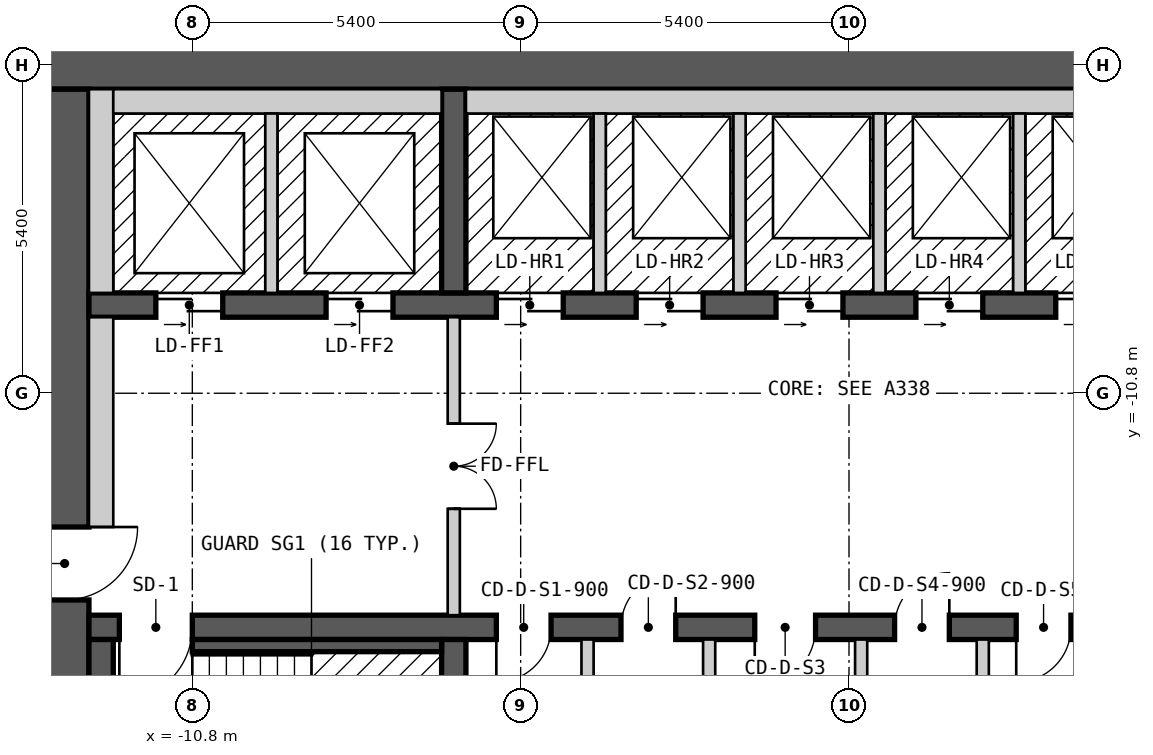
"""IFC4 building model, lengths in metres.
Left out: names, types, materials, properties, quantities, classifications, styles, units other than length and angle.
Written with IfcOpenShell. Run it as: python <this file> out.ifc"""

import sys

from ifc_helpers import new_model, si_unit, direction, frame, frame_2d, origin, place, context, subcontext, project, spatial, rectangle, extrude, element, fill, save


model = new_model("IFC4")
c1 = context("Model", 3, precision=1e-05, world=origin(), true_north=direction((0.0, 1.0)))
c2 = subcontext(c1, "Body", "Model", "MODEL_VIEW")
j1 = project(units=[si_unit("LENGTHUNIT", "METRE"), si_unit("PLANEANGLEUNIT", "RADIAN")], contexts=[c1])
p1 = place(None, origin())
s1 = spatial("IfcSite", under=j1, at=p1, CompositionType="ELEMENT")
p2 = place(p1, origin())
s2 = spatial("IfcBuilding", under=s1, at=p2, CompositionType="ELEMENT")
p3 = place(p2, frame((0.0, 0.0, 138.6)))
s3 = spatial("IfcBuildingStorey", under=s2, at=p3, CompositionType="ELEMENT", Elevation=138.6)
p4 = place(p3, frame((-13.3, -5.4, 0.0), z_axis=(0.0, 0.0, 1.0), x_axis=(1.0, 0.0, 0.0)))
e1 = element("IfcWall", 1, at=p4, inside=s3, PredefinedType="SHEAR", context=c2, shape_type="SweptSolid", body=[
    extrude(rectangle(XDim=26.6, YDim=0.8, at=frame_2d((13.3, 0.0))), origin(), (0.0, 0.0, 1.0), 2.7),
])
p5 = place(p4, frame((23.65, 0.0, 0.0)))
e2 = element("IfcOpeningElement", 2, at=p5, cuts=e1, PredefinedType="OPENING", context=c2, shape_type="SweptSolid", body=[
    extrude(rectangle(XDim=1.2, YDim=2.1, at=frame_2d((0.6, 1.05))), frame((0.0, 0.41, 0.0), z_axis=(0.0, -1.0, 0.0), x_axis=(1.0, 0.0, 0.0)), (0.0, 0.0, 1.0), 0.82),
])
p6 = place(p3, frame((-12.9, -18.2, 0.0), z_axis=(0.0, 0.0, 1.0), x_axis=(0.0, 1.0, 0.0)))
e3 = element("IfcWall", 3, at=p6, inside=s3, PredefinedType="SHEAR", context=c2, shape_type="SweptSolid", body=[
    extrude(rectangle(XDim=12.4, YDim=0.8, at=frame_2d((6.2, 0.0))), origin(), (0.0, 0.0, 1.0), 2.7),
])
p7 = place(p6, frame((4.0, 0.0, 0.0)))
e4 = element("IfcOpeningElement", 4, at=p7, cuts=e3, PredefinedType="OPENING", context=c2, shape_type="SweptSolid", body=[
    extrude(rectangle(XDim=1.2, YDim=2.1, at=frame_2d((0.6, 1.05))), frame((0.0, 0.41, 0.0), z_axis=(0.0, -1.0, 0.0), x_axis=(1.0, 0.0, 0.0)), (0.0, 0.0, 1.0), 0.82),
])
p8 = place(p3, frame((-12.5, -14.65, 0.0), z_axis=(0.0, 0.0, 1.0), x_axis=(1.0, 0.0, 0.0)))
e5 = element("IfcWall", 5, at=p8, inside=s3, PredefinedType="SHEAR", context=c2, shape_type="SweptSolid", body=[
    extrude(rectangle(XDim=25.0, YDim=0.4, at=frame_2d((12.5, 0.0))), origin(), (0.0, 0.0, 1.0), 2.7),
])
p9 = place(p8, frame((1.7, 0.0, 0.0), z_axis=(0.0, 0.0, 1.0), x_axis=(-1.0, 0.0, 0.0)))
e6 = element("IfcOpeningElement", 6, at=p9, cuts=e5, PredefinedType="OPENING", context=c2, shape_type="SweptSolid", body=[
    extrude(rectangle(XDim=1.2, YDim=2.1, at=frame_2d((0.6, 1.05))), frame((0.0, 0.21, 0.0), z_axis=(0.0, -1.0, 0.0), x_axis=(1.0, 0.0, 0.0)), (0.0, 0.0, 1.0), 0.42),
])
p10 = place(p8, frame((24.55, 0.0, 0.0), z_axis=(0.0, 0.0, 1.0), x_axis=(-1.0, 0.0, 0.0)))
e7 = element("IfcOpeningElement", 7, at=p10, cuts=e5, PredefinedType="OPENING", context=c2, shape_type="SweptSolid", body=[
    extrude(rectangle(XDim=1.2, YDim=2.1, at=frame_2d((0.6, 1.05))), frame((0.0, 0.21, 0.0), z_axis=(0.0, -1.0, 0.0), x_axis=(1.0, 0.0, 0.0)), (0.0, 0.0, 1.0), 0.42),
])
p11 = place(p8, frame((7.6, 0.0, 0.0), z_axis=(0.0, 0.0, 1.0), x_axis=(-1.0, 0.0, 0.0)))
e8 = element("IfcOpeningElement", 8, at=p11, cuts=e5, PredefinedType="OPENING", context=c2, shape_type="SweptSolid", body=[
    extrude(rectangle(XDim=0.9, YDim=2.1, at=frame_2d((0.45, 1.05))), frame((0.0, 0.21, 0.0), z_axis=(0.0, -1.0, 0.0), x_axis=(1.0, 0.0, 0.0)), (0.0, 0.0, 1.0), 0.42),
])
p12 = place(p8, frame((9.65, 0.0, 0.0), z_axis=(0.0, 0.0, 1.0), x_axis=(-1.0, 0.0, 0.0)))
e9 = element("IfcOpeningElement", 9, at=p12, cuts=e5, PredefinedType="OPENING", context=c2, shape_type="SweptSolid", body=[
    extrude(rectangle(XDim=0.9, YDim=2.1, at=frame_2d((0.45, 1.05))), frame((0.0, 0.21, 0.0), z_axis=(0.0, -1.0, 0.0), x_axis=(1.0, 0.0, 0.0)), (0.0, 0.0, 1.0), 0.42),
])
p13 = place(p8, frame((11.95, 0.0, 0.0), z_axis=(0.0, 0.0, 1.0), x_axis=(-1.0, 0.0, 0.0)))
e10 = element("IfcOpeningElement", 10, at=p13, cuts=e5, PredefinedType="OPENING", context=c2, shape_type="SweptSolid", body=[
    extrude(rectangle(XDim=1.0, YDim=2.1, at=frame_2d((0.5, 1.05))), frame((0.0, 0.21, 0.0), z_axis=(0.0, -1.0, 0.0), x_axis=(1.0, 0.0, 0.0)), (0.0, 0.0, 1.0), 0.42),
])
p14 = place(p8, frame((14.15, 0.0, 0.0), z_axis=(0.0, 0.0, 1.0), x_axis=(-1.0, 0.0, 0.0)))
e11 = element("IfcOpeningElement", 11, at=p14, cuts=e5, PredefinedType="OPENING", context=c2, shape_type="SweptSolid", body=[
    extrude(rectangle(XDim=0.9, YDim=2.1, at=frame_2d((0.45, 1.05))), frame((0.0, 0.21, 0.0), z_axis=(0.0, -1.0, 0.0), x_axis=(1.0, 0.0, 0.0)), (0.0, 0.0, 1.0), 0.42),
])
p15 = place(p8, frame((16.15, 0.0, 0.0), z_axis=(0.0, 0.0, 1.0), x_axis=(-1.0, 0.0, 0.0)))
e12 = element("IfcOpeningElement", 12, at=p15, cuts=e5, PredefinedType="OPENING", context=c2, shape_type="SweptSolid", body=[
    extrude(rectangle(XDim=0.9, YDim=2.1, at=frame_2d((0.45, 1.05))), frame((0.0, 0.21, 0.0), z_axis=(0.0, -1.0, 0.0), x_axis=(1.0, 0.0, 0.0)), (0.0, 0.0, 1.0), 0.42),
])
p16 = place(p8, frame((18.3, 0.0, 0.0), z_axis=(0.0, 0.0, 1.0), x_axis=(-1.0, 0.0, 0.0)))
e13 = element("IfcOpeningElement", 13, at=p16, cuts=e5, PredefinedType="OPENING", context=c2, shape_type="SweptSolid", body=[
    extrude(rectangle(XDim=1.0, YDim=2.1, at=frame_2d((0.5, 1.05))), frame((0.0, 0.21, 0.0), z_axis=(0.0, -1.0, 0.0), x_axis=(1.0, 0.0, 0.0)), (0.0, 0.0, 1.0), 0.42),
])
p17 = place(p3, frame((-12.5, -9.35, 0.0), z_axis=(0.0, 0.0, 1.0), x_axis=(1.0, 0.0, 0.0)))
e14 = element("IfcWall", 14, at=p17, inside=s3, PredefinedType="SHEAR", context=c2, shape_type="SweptSolid", body=[
    extrude(rectangle(XDim=22.7, YDim=0.4, at=frame_2d((11.35, 0.0))), origin(), (0.0, 0.0, 1.0), 2.7),
])
p18 = place(p17, frame((1.1, 0.0, 0.0)))
e15 = element("IfcOpeningElement", 15, at=p18, cuts=e14, PredefinedType="OPENING", context=c2, shape_type="SweptSolid", body=[
    extrude(rectangle(XDim=1.1, YDim=2.1, at=frame_2d((0.55, 1.05))), frame((0.0, 0.21, 0.0), z_axis=(0.0, -1.0, 0.0), x_axis=(1.0, 0.0, 0.0)), (0.0, 0.0, 1.0), 0.42),
])
p19 = place(p17, frame((3.9, 0.0, 0.0)))
e16 = element("IfcOpeningElement", 16, at=p19, cuts=e14, PredefinedType="OPENING", context=c2, shape_type="SweptSolid", body=[
    extrude(rectangle(XDim=1.1, YDim=2.1, at=frame_2d((0.55, 1.05))), frame((0.0, 0.21, 0.0), z_axis=(0.0, -1.0, 0.0), x_axis=(1.0, 0.0, 0.0)), (0.0, 0.0, 1.0), 0.42),
])
p20 = place(p17, frame((6.7, 0.0, 0.0)))
e17 = element("IfcOpeningElement", 17, at=p20, cuts=e14, PredefinedType="OPENING", context=c2, shape_type="SweptSolid", body=[
    extrude(rectangle(XDim=1.1, YDim=2.1, at=frame_2d((0.55, 1.05))), frame((0.0, 0.21, 0.0), z_axis=(0.0, -1.0, 0.0), x_axis=(1.0, 0.0, 0.0)), (0.0, 0.0, 1.0), 0.42),
])
p21 = place(p17, frame((9.0, 0.0, 0.0)))
e18 = element("IfcOpeningElement", 18, at=p21, cuts=e14, PredefinedType="OPENING", context=c2, shape_type="SweptSolid", body=[
    extrude(rectangle(XDim=1.1, YDim=2.1, at=frame_2d((0.55, 1.05))), frame((0.0, 0.21, 0.0), z_axis=(0.0, -1.0, 0.0), x_axis=(1.0, 0.0, 0.0)), (0.0, 0.0, 1.0), 0.42),
])
p22 = place(p17, frame((11.3, 0.0, 0.0)))
e19 = element("IfcOpeningElement", 19, at=p22, cuts=e14, PredefinedType="OPENING", context=c2, shape_type="SweptSolid", body=[
    extrude(rectangle(XDim=1.1, YDim=2.1, at=frame_2d((0.55, 1.05))), frame((0.0, 0.21, 0.0), z_axis=(0.0, -1.0, 0.0), x_axis=(1.0, 0.0, 0.0)), (0.0, 0.0, 1.0), 0.42),
])
p23 = place(p17, frame((13.6, 0.0, 0.0)))
e20 = element("IfcOpeningElement", 20, at=p23, cuts=e14, PredefinedType="OPENING", context=c2, shape_type="SweptSolid", body=[
    extrude(rectangle(XDim=1.1, YDim=2.1, at=frame_2d((0.55, 1.05))), frame((0.0, 0.21, 0.0), z_axis=(0.0, -1.0, 0.0), x_axis=(1.0, 0.0, 0.0)), (0.0, 0.0, 1.0), 0.42),
])
p24 = place(p17, frame((15.9, 0.0, 0.0)))
e21 = element("IfcOpeningElement", 21, at=p24, cuts=e14, PredefinedType="OPENING", context=c2, shape_type="SweptSolid", body=[
    extrude(rectangle(XDim=1.1, YDim=2.1, at=frame_2d((0.55, 1.05))), frame((0.0, 0.21, 0.0), z_axis=(0.0, -1.0, 0.0), x_axis=(1.0, 0.0, 0.0)), (0.0, 0.0, 1.0), 0.42),
])
p25 = place(p17, frame((18.2, 0.0, 0.0)))
e22 = element("IfcOpeningElement", 22, at=p25, cuts=e14, PredefinedType="OPENING", context=c2, shape_type="SweptSolid", body=[
    extrude(rectangle(XDim=1.1, YDim=2.1, at=frame_2d((0.55, 1.05))), frame((0.0, 0.21, 0.0), z_axis=(0.0, -1.0, 0.0), x_axis=(1.0, 0.0, 0.0)), (0.0, 0.0, 1.0), 0.42),
])
p26 = place(p17, frame((20.6, 0.0, 0.0)))
e23 = element("IfcOpeningElement", 23, at=p26, cuts=e14, PredefinedType="OPENING", context=c2, shape_type="SweptSolid", body=[
    extrude(rectangle(XDim=1.1, YDim=2.1, at=frame_2d((0.55, 1.05))), frame((0.0, 0.21, 0.0), z_axis=(0.0, -1.0, 0.0), x_axis=(1.0, 0.0, 0.0)), (0.0, 0.0, 1.0), 0.42),
])
for number, where, z_axis, x_axis in (
    (24, (-6.5, -18.2, 0.0), (0.0, 0.0, 1.0), (0.0, 1.0, 0.0)),
    (25, (-6.5, -9.15, 0.0), (0.0, 0.0, 1.0), (0.0, 1.0, 0.0)),
):
    element("IfcWall", number, at=place(p3, frame(where, z_axis=z_axis, x_axis=x_axis)), inside=s3, PredefinedType="SHEAR", context=c2, shape_type="SweptSolid", body=[
        extrude(rectangle(XDim=3.35, YDim=0.4, at=frame_2d((1.675, 0.0))), origin(), (0.0, 0.0, 1.0), 2.7),
    ])
p27 = place(p3, frame((-12.3, -18.2, 0.0), z_axis=(0.0, 0.0, 1.0), x_axis=(0.0, 1.0, 0.0)))
e26 = element("IfcWall", 26, at=p27, inside=s3, PredefinedType="SOLIDWALL", context=c2, shape_type="SweptSolid", body=[
    extrude(rectangle(XDim=3.35, YDim=0.4, at=frame_2d((1.675, 0.0))), origin(), (0.0, 0.0, 1.0), 2.7),
])
p28 = place(p3, frame((-12.3, -13.0, 0.0), z_axis=(0.0, 0.0, 1.0), x_axis=(0.0, 1.0, 0.0)))
e27 = element("IfcWall", 27, at=p28, inside=s3, PredefinedType="PARTITIONING", context=c2, shape_type="SweptSolid", body=[
    extrude(rectangle(XDim=3.45, YDim=0.4, at=frame_2d((1.725, 0.0))), origin(), (0.0, 0.0, 1.0), 2.7),
])
p29 = place(p3, frame((-12.3, -9.15, 0.0), z_axis=(0.0, 0.0, 1.0), x_axis=(0.0, 1.0, 0.0)))
e28 = element("IfcWall", 28, at=p29, inside=s3, PredefinedType="SOLIDWALL", context=c2, shape_type="SweptSolid", body=[
    extrude(rectangle(XDim=3.35, YDim=0.4, at=frame_2d((1.675, 0.0))), origin(), (0.0, 0.0, 1.0), 2.7),
])
p30 = place(p3, frame((-12.1, -6.0, 0.0), z_axis=(0.0, 0.0, 1.0), x_axis=(1.0, 0.0, 0.0)))
e29 = element("IfcWall", 29, at=p30, inside=s3, PredefinedType="SOLIDWALL", context=c2, shape_type="SweptSolid", body=[
    extrude(rectangle(XDim=5.4, YDim=0.4, at=frame_2d((2.7, 0.0))), origin(), (0.0, 0.0, 1.0), 2.7),
])
p31 = place(p3, frame((-10.8, -14.95, 0.0), z_axis=(0.0, 0.0, 1.0), x_axis=(1.0, 0.0, 0.0)))
e30 = element("IfcWall", 30, at=p31, inside=s3, PredefinedType="SOLIDWALL", context=c2, shape_type="SweptSolid", body=[
    extrude(rectangle(XDim=4.1, YDim=0.2, at=frame_2d((2.05, 0.0))), origin(), (0.0, 0.0, 1.0), 2.7),
])
p32 = place(p3, frame((-9.5, -9.15, 0.0), z_axis=(0.0, 0.0, 1.0), x_axis=(0.0, 1.0, 0.0)))
e31 = element("IfcWall", 31, at=p32, inside=s3, PredefinedType="SOLIDWALL", context=c2, shape_type="SweptSolid", body=[
    extrude(rectangle(XDim=2.95, YDim=0.2, at=frame_2d((1.475, 0.0))), origin(), (0.0, 0.0, 1.0), 2.7),
])
p33 = place(p3, frame((-6.5, -14.45, 0.0), z_axis=(0.0, 0.0, 1.0), x_axis=(0.0, 1.0, 0.0)))
e32 = element("IfcWall", 32, at=p33, inside=s3, PredefinedType="PARTITIONING", context=c2, shape_type="SweptSolid", body=[
    extrude(rectangle(XDim=4.9, YDim=0.2, at=frame_2d((2.45, 0.0))), origin(), (0.0, 0.0, 1.0), 2.7),
])
p34 = place(p33, frame((3.15, 0.0, 0.0), z_axis=(0.0, 0.0, 1.0), x_axis=(-1.0, 0.0, 0.0)))
e33 = element("IfcOpeningElement", 33, at=p34, cuts=e32, PredefinedType="OPENING", context=c2, shape_type="SweptSolid", body=[
    extrude(rectangle(XDim=1.4, YDim=2.1, at=frame_2d((0.7, 1.05))), frame((0.0, 0.11, 0.0), z_axis=(0.0, -1.0, 0.0), x_axis=(1.0, 0.0, 0.0)), (0.0, 0.0, 1.0), 0.22),
])
p35 = place(p3, frame((-6.3, -6.0, 0.0), z_axis=(0.0, 0.0, 1.0), x_axis=(1.0, 0.0, 0.0)))
e34 = element("IfcWall", 34, at=p35, inside=s3, PredefinedType="SOLIDWALL", context=c2, shape_type="SweptSolid", body=[
    extrude(rectangle(XDim=16.1, YDim=0.4, at=frame_2d((8.05, 0.0))), origin(), (0.0, 0.0, 1.0), 2.7),
])
p36 = place(p3, frame((-4.3, -17.8, 0.0), z_axis=(0.0, 0.0, 1.0), x_axis=(0.0, 1.0, 0.0)))
e35 = element("IfcWall", 35, at=p36, inside=s3, PredefinedType="PARTITIONING", context=c2, shape_type="SweptSolid", body=[
    extrude(rectangle(XDim=2.95, YDim=0.2, at=frame_2d((1.475, 0.0))), origin(), (0.0, 0.0, 1.0), 2.7),
])
p37 = place(p3, frame((-4.1, -9.15, 0.0), z_axis=(0.0, 0.0, 1.0), x_axis=(0.0, 1.0, 0.0)))
e36 = element("IfcWall", 36, at=p37, inside=s3, PredefinedType="SOLIDWALL", context=c2, shape_type="SweptSolid", body=[
    extrude(rectangle(XDim=2.95, YDim=0.2, at=frame_2d((1.475, 0.0))), origin(), (0.0, 0.0, 1.0), 2.7),
])
p38 = place(p3, frame((-2.3, -17.8, 0.0), z_axis=(0.0, 0.0, 1.0), x_axis=(0.0, 1.0, 0.0)))
e37 = element("IfcWall", 37, at=p38, inside=s3, PredefinedType="PARTITIONING", context=c2, shape_type="SweptSolid", body=[
    extrude(rectangle(XDim=2.95, YDim=0.2, at=frame_2d((1.475, 0.0))), origin(), (0.0, 0.0, 1.0), 2.7),
])
p39 = place(p3, frame((-1.8, -9.15, 0.0), z_axis=(0.0, 0.0, 1.0), x_axis=(0.0, 1.0, 0.0)))
e38 = element("IfcWall", 38, at=p39, inside=s3, PredefinedType="SOLIDWALL", context=c2, shape_type="SweptSolid", body=[
    extrude(rectangle(XDim=2.95, YDim=0.2, at=frame_2d((1.475, 0.0))), origin(), (0.0, 0.0, 1.0), 2.7),
])
p40 = place(p3, frame((0.2, -17.8, 0.0), z_axis=(0.0, 0.0, 1.0), x_axis=(0.0, 1.0, 0.0)))
e39 = element("IfcWall", 39, at=p40, inside=s3, PredefinedType="PARTITIONING", context=c2, shape_type="SweptSolid", body=[
    extrude(rectangle(XDim=2.95, YDim=0.2, at=frame_2d((1.475, 0.0))), origin(), (0.0, 0.0, 1.0), 2.7),
])
p41 = place(p3, frame((0.5, -9.15, 0.0), z_axis=(0.0, 0.0, 1.0), x_axis=(0.0, 1.0, 0.0)))
e40 = element("IfcWall", 40, at=p41, inside=s3, PredefinedType="SOLIDWALL", context=c2, shape_type="SweptSolid", body=[
    extrude(rectangle(XDim=2.95, YDim=0.2, at=frame_2d((1.475, 0.0))), origin(), (0.0, 0.0, 1.0), 2.7),
])
p42 = place(p3, frame((2.2, -17.8, 0.0), z_axis=(0.0, 0.0, 1.0), x_axis=(0.0, 1.0, 0.0)))
e41 = element("IfcWall", 41, at=p42, inside=s3, PredefinedType="PARTITIONING", context=c2, shape_type="SweptSolid", body=[
    extrude(rectangle(XDim=2.95, YDim=0.2, at=frame_2d((1.475, 0.0))), origin(), (0.0, 0.0, 1.0), 2.7),
])
p43 = place(p3, frame((2.8, -9.15, 0.0), z_axis=(0.0, 0.0, 1.0), x_axis=(0.0, 1.0, 0.0)))
e42 = element("IfcWall", 42, at=p43, inside=s3, PredefinedType="SOLIDWALL", context=c2, shape_type="SweptSolid", body=[
    extrude(rectangle(XDim=2.95, YDim=0.2, at=frame_2d((1.475, 0.0))), origin(), (0.0, 0.0, 1.0), 2.7),
])
p44 = place(p18, origin())
e43 = element("IfcDoor", 43, at=p44, inside=s3, OperationType="DOUBLE_DOOR_SLIDING", PredefinedType="DOOR", context=c2, shape_type="SweptSolid", body=[
    extrude(rectangle(XDim=1.1, YDim=2.1, at=frame_2d((0.55, 1.05))), frame((0.0, 0.025, 0.0), z_axis=(0.0, -1.0, 0.0), x_axis=(1.0, 0.0, 0.0)), (0.0, 0.0, 1.0), 0.05),
])
fill(e15, e43)
p45 = place(p19, origin())
e44 = element("IfcDoor", 44, at=p45, inside=s3, OperationType="DOUBLE_DOOR_SLIDING", PredefinedType="DOOR", context=c2, shape_type="SweptSolid", body=[
    extrude(rectangle(XDim=1.1, YDim=2.1, at=frame_2d((0.55, 1.05))), frame((0.0, 0.025, 0.0), z_axis=(0.0, -1.0, 0.0), x_axis=(1.0, 0.0, 0.0)), (0.0, 0.0, 1.0), 0.05),
])
fill(e16, e44)
p46 = place(p20, origin())
e45 = element("IfcDoor", 45, at=p46, inside=s3, OperationType="DOUBLE_DOOR_SLIDING", PredefinedType="DOOR", context=c2, shape_type="SweptSolid", body=[
    extrude(rectangle(XDim=1.1, YDim=2.1, at=frame_2d((0.55, 1.05))), frame((0.0, 0.025, 0.0), z_axis=(0.0, -1.0, 0.0), x_axis=(1.0, 0.0, 0.0)), (0.0, 0.0, 1.0), 0.05),
])
fill(e17, e45)
p47 = place(p21, origin())
e46 = element("IfcDoor", 46, at=p47, inside=s3, OperationType="DOUBLE_DOOR_SLIDING", PredefinedType="DOOR", context=c2, shape_type="SweptSolid", body=[
    extrude(rectangle(XDim=1.1, YDim=2.1, at=frame_2d((0.55, 1.05))), frame((0.0, 0.025, 0.0), z_axis=(0.0, -1.0, 0.0), x_axis=(1.0, 0.0, 0.0)), (0.0, 0.0, 1.0), 0.05),
])
fill(e18, e46)
p48 = place(p22, origin())
e47 = element("IfcDoor", 47, at=p48, inside=s3, OperationType="DOUBLE_DOOR_SLIDING", PredefinedType="DOOR", context=c2, shape_type="SweptSolid", body=[
    extrude(rectangle(XDim=1.1, YDim=2.1, at=frame_2d((0.55, 1.05))), frame((0.0, 0.025, 0.0), z_axis=(0.0, -1.0, 0.0), x_axis=(1.0, 0.0, 0.0)), (0.0, 0.0, 1.0), 0.05),
])
fill(e19, e47)
p49 = place(p23, origin())
e48 = element("IfcDoor", 48, at=p49, inside=s3, OperationType="DOUBLE_DOOR_SLIDING", PredefinedType="DOOR", context=c2, shape_type="SweptSolid", body=[
    extrude(rectangle(XDim=1.1, YDim=2.1, at=frame_2d((0.55, 1.05))), frame((0.0, 0.025, 0.0), z_axis=(0.0, -1.0, 0.0), x_axis=(1.0, 0.0, 0.0)), (0.0, 0.0, 1.0), 0.05),
])
fill(e20, e48)
p50 = place(p24, origin())
e49 = element("IfcDoor", 49, at=p50, inside=s3, OperationType="DOUBLE_DOOR_SLIDING", PredefinedType="DOOR", context=c2, shape_type="SweptSolid", body=[
    extrude(rectangle(XDim=1.1, YDim=2.1, at=frame_2d((0.55, 1.05))), frame((0.0, 0.025, 0.0), z_axis=(0.0, -1.0, 0.0), x_axis=(1.0, 0.0, 0.0)), (0.0, 0.0, 1.0), 0.05),
])
fill(e21, e49)
p51 = place(p9, origin())
e50 = element("IfcDoor", 50, at=p51, inside=s3, OperationType="SINGLE_SWING_RIGHT", PredefinedType="DOOR", context=c2, shape_type="SweptSolid", body=[
    extrude(rectangle(XDim=1.2, YDim=2.1, at=frame_2d((0.6, 1.05))), frame((0.0, 0.025, 0.0), z_axis=(0.0, -1.0, 0.0), x_axis=(1.0, 0.0, 0.0)), (0.0, 0.0, 1.0), 0.05),
])
fill(e6, e50)
p52 = place(p7, origin())
e51 = element("IfcDoor", 51, at=p52, inside=s3, OperationType="SINGLE_SWING_RIGHT", PredefinedType="DOOR", context=c2, shape_type="SweptSolid", body=[
    extrude(rectangle(XDim=1.2, YDim=2.1, at=frame_2d((0.6, 1.05))), frame((0.0, 0.025, 0.0), z_axis=(0.0, -1.0, 0.0), x_axis=(1.0, 0.0, 0.0)), (0.0, 0.0, 1.0), 0.05),
])
fill(e4, e51)
p53 = place(p34, origin())
e52 = element("IfcDoor", 52, at=p53, inside=s3, OperationType="DOUBLE_DOOR_SINGLE_SWING", PredefinedType="DOOR", context=c2, shape_type="SweptSolid", body=[
    extrude(rectangle(XDim=1.4, YDim=2.1, at=frame_2d((0.7, 1.05))), frame((0.0, 0.025, 0.0), z_axis=(0.0, -1.0, 0.0), x_axis=(1.0, 0.0, 0.0)), (0.0, 0.0, 1.0), 0.05),
])
fill(e33, e52)
p54 = place(p11, origin())
e53 = element("IfcDoor", 53, at=p54, inside=s3, OperationType="SINGLE_SWING_RIGHT", PredefinedType="DOOR", context=c2, shape_type="SweptSolid", body=[
    extrude(rectangle(XDim=0.9, YDim=2.1, at=frame_2d((0.45, 1.05))), frame((0.0, 0.025, 0.0), z_axis=(0.0, -1.0, 0.0), x_axis=(1.0, 0.0, 0.0)), (0.0, 0.0, 1.0), 0.05),
])
fill(e8, e53)
p55 = place(p12, origin())
e54 = element("IfcDoor", 54, at=p55, inside=s3, OperationType="SINGLE_SWING_LEFT", PredefinedType="DOOR", context=c2, shape_type="SweptSolid", body=[
    extrude(rectangle(XDim=0.9, YDim=2.1, at=frame_2d((0.45, 1.05))), frame((0.0, 0.025, 0.0), z_axis=(0.0, -1.0, 0.0), x_axis=(1.0, 0.0, 0.0)), (0.0, 0.0, 1.0), 0.05),
])
fill(e9, e54)
p56 = place(p13, origin())
e55 = element("IfcDoor", 55, at=p56, inside=s3, OperationType="SINGLE_SWING_RIGHT", PredefinedType="DOOR", context=c2, shape_type="SweptSolid", body=[
    extrude(rectangle(XDim=1.0, YDim=2.1, at=frame_2d((0.5, 1.05))), frame((0.0, 0.025, 0.0), z_axis=(0.0, -1.0, 0.0), x_axis=(1.0, 0.0, 0.0)), (0.0, 0.0, 1.0), 0.05),
])
fill(e10, e55)
p57 = place(p14, origin())
e56 = element("IfcDoor", 56, at=p57, inside=s3, OperationType="SINGLE_SWING_LEFT", PredefinedType="DOOR", context=c2, shape_type="SweptSolid", body=[
    extrude(rectangle(XDim=0.9, YDim=2.1, at=frame_2d((0.45, 1.05))), frame((0.0, 0.025, 0.0), z_axis=(0.0, -1.0, 0.0), x_axis=(1.0, 0.0, 0.0)), (0.0, 0.0, 1.0), 0.05),
])
fill(e11, e56)
p58 = place(p15, origin())
e57 = element("IfcDoor", 57, at=p58, inside=s3, OperationType="SINGLE_SWING_RIGHT", PredefinedType="DOOR", context=c2, shape_type="SweptSolid", body=[
    extrude(rectangle(XDim=0.9, YDim=2.1, at=frame_2d((0.45, 1.05))), frame((0.0, 0.025, 0.0), z_axis=(0.0, -1.0, 0.0), x_axis=(1.0, 0.0, 0.0)), (0.0, 0.0, 1.0), 0.05),
])
fill(e12, e57)
save(model, sys.argv[1])
